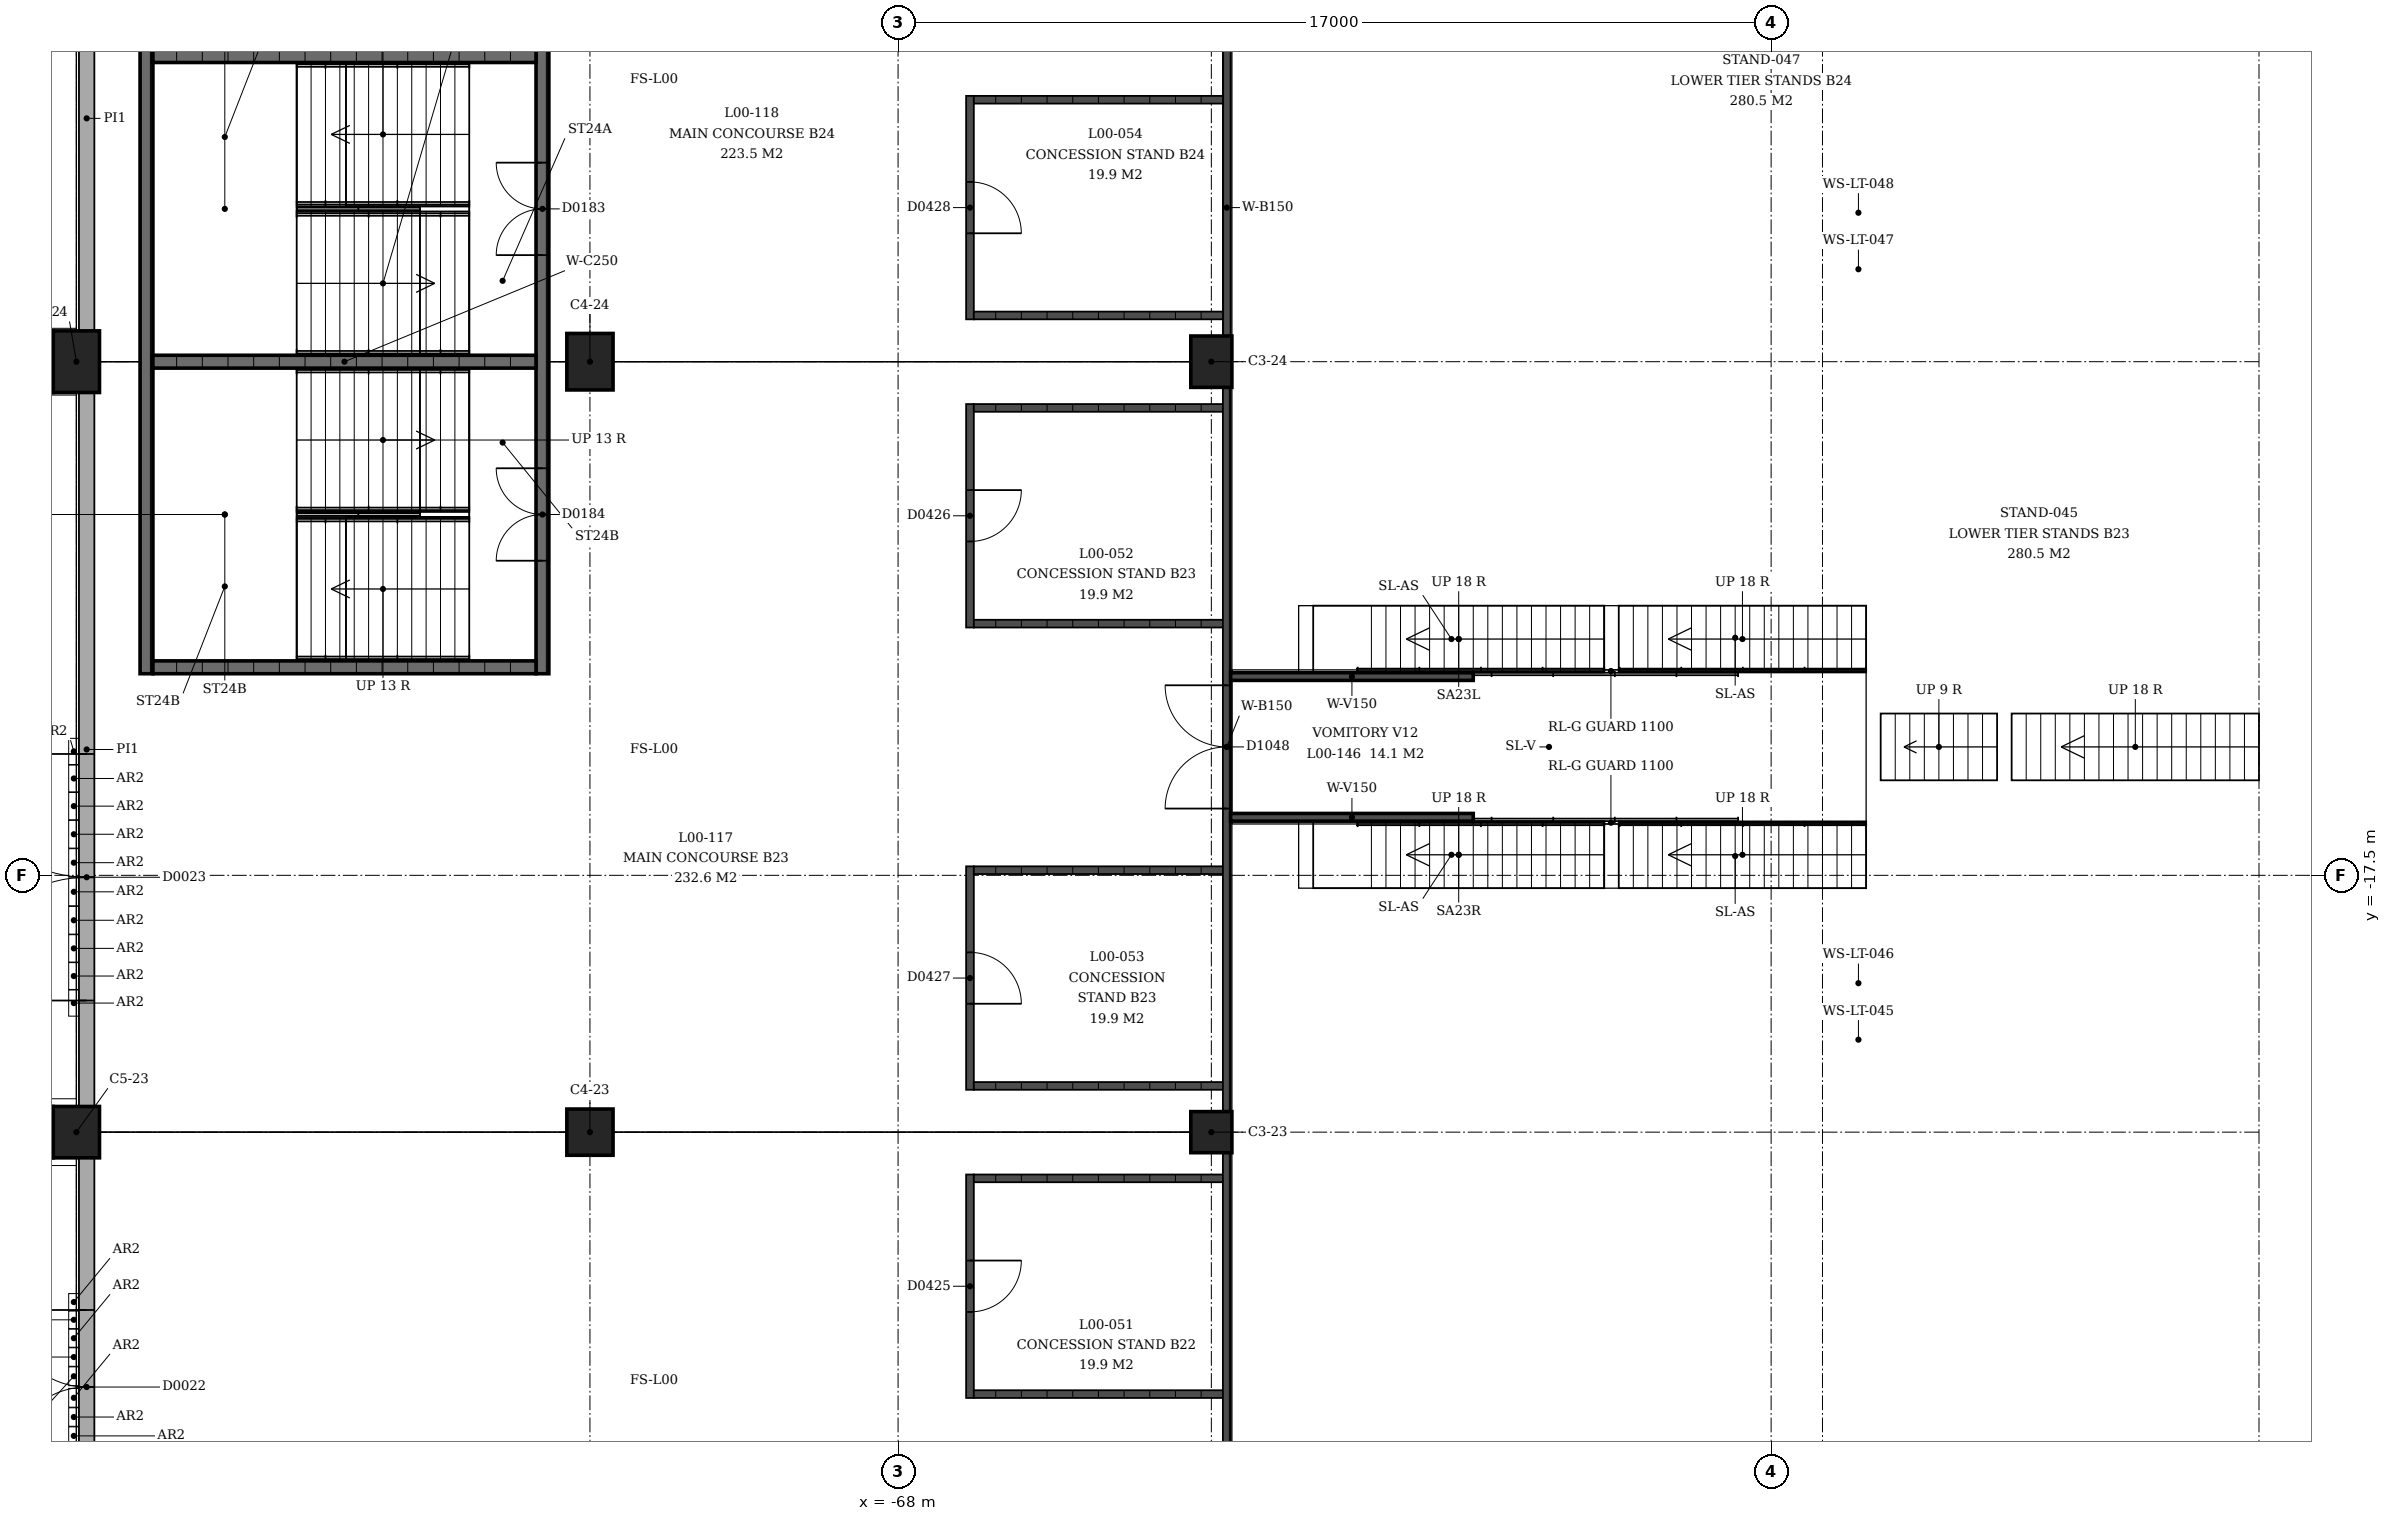
"""IFC4 building model, lengths in metres.
Left out: names, types, materials, properties, quantities, classifications, styles, units other than length and angle.
Written with IfcOpenShell. Run it as: python <this file> out.ifc"""

import sys

from ifc_helpers import new_model, si_unit, direction, frame, frame_2d, origin, origin_2d, place, context, subcontext, project, spatial, rectangle, extrude, element, fill, save


model = new_model("IFC4")
c1 = context("Model", 3, precision=1e-05, world=origin(), true_north=direction((0.0, 1.0)))
c2 = subcontext(c1, "Body", "Model", "MODEL_VIEW")
j1 = project(units=[si_unit("LENGTHUNIT", "METRE"), si_unit("PLANEANGLEUNIT", "RADIAN")], contexts=[c1])
p1 = place(None, origin())
s1 = spatial("IfcSite", under=j1, at=p1, CompositionType="ELEMENT")
p2 = place(p1, origin())
s2 = spatial("IfcBuilding", under=s1, at=p2, CompositionType="ELEMENT")
p3 = place(p2, origin())
s3 = spatial("IfcBuildingStorey", under=s2, at=p3, CompositionType="ELEMENT", Elevation=0.0)
p4 = place(p3, frame((-61.9, -22.5, 0.0), z_axis=(0.0, 0.0, 1.0), x_axis=(0.0, -1.0, 0.0)))
e1 = element("IfcColumn", 1, at=p4, inside=s3, PredefinedType="COLUMN", context=c2, shape_type="SweptSolid", body=[
    extrude(rectangle(XDim=0.8, YDim=0.8, at=origin_2d()), origin(), (0.0, 0.0, 1.0), 4.5),
])
p5 = place(p3, frame((-74.0, -22.5, 0.0), z_axis=(0.0, 0.0, 1.0), x_axis=(0.0, -1.0, 0.0)))
e2 = element("IfcColumn", 2, at=p5, inside=s3, PredefinedType="COLUMN", context=c2, shape_type="SweptSolid", body=[
    extrude(rectangle(XDim=0.9, YDim=0.9, at=origin_2d()), origin(), (0.0, 0.0, 1.0), 4.5),
])
p6 = place(p3, frame((-84.0, -22.5, 0.0), z_axis=(0.0, 0.0, 1.0), x_axis=(0.0, -1.0, 0.0)))
e3 = element("IfcColumn", 3, at=p6, inside=s3, PredefinedType="COLUMN", context=c2, shape_type="SweptSolid", body=[
    extrude(rectangle(XDim=1.0, YDim=0.9, at=origin_2d()), origin(), (0.0, 0.0, 1.0), 4.5),
])
p7 = place(p3, frame((-61.9, -7.5, 0.0), z_axis=(0.0, 0.0, 1.0), x_axis=(0.0, -1.0, 0.0)))
e4 = element("IfcColumn", 4, at=p7, inside=s3, PredefinedType="COLUMN", context=c2, shape_type="SweptSolid", body=[
    extrude(rectangle(XDim=1.0, YDim=0.8, at=origin_2d()), origin(), (0.0, 0.0, 1.0), 4.5),
])
p8 = place(p3, frame((-74.0, -7.5, 0.0), z_axis=(0.0, 0.0, 1.0), x_axis=(0.0, -1.0, 0.0)))
e5 = element("IfcColumn", 5, at=p8, inside=s3, PredefinedType="COLUMN", context=c2, shape_type="SweptSolid", body=[
    extrude(rectangle(XDim=1.1, YDim=0.9, at=origin_2d()), origin(), (0.0, 0.0, 1.0), 4.5),
])
p9 = place(p3, frame((-84.0, -7.5, 0.0), z_axis=(0.0, 0.0, 1.0), x_axis=(0.0, -1.0, 0.0)))
e6 = element("IfcColumn", 6, at=p9, inside=s3, PredefinedType="COLUMN", context=c2, shape_type="SweptSolid", body=[
    extrude(rectangle(XDim=1.2, YDim=0.9, at=origin_2d()), origin(), (0.0, 0.0, 1.0), 4.5),
])
p10 = place(p3, frame((-83.8, -36.9, 0.0), z_axis=(0.0, 0.0, 1.0), x_axis=(0.0, 1.0, 0.0)))
e7 = element("IfcWall", 7, at=p10, inside=s3, PredefinedType="SOLIDWALL", context=c2, shape_type="SweptSolid", body=[
    extrude(rectangle(XDim=13.9, YDim=0.3, at=frame_2d((6.95, 0.0))), origin(), (0.0, 0.0, 1.0), 3.09),
])
p11 = place(p10, frame((7.938, 0.0, 0.0)))
e8 = element("IfcOpeningElement", 8, at=p11, cuts=e7, PredefinedType="OPENING", context=c2, shape_type="SweptSolid", body=[
    extrude(rectangle(XDim=3.0, YDim=2.4, at=frame_2d((1.5, 1.2))), frame((0.0, 0.16, 0.0), z_axis=(0.0, -1.0, 0.0), x_axis=(1.0, 0.0, 0.0)), (0.0, 0.0, 1.0), 0.32),
])
p12 = place(p3, frame((-83.8, -22.0, 0.0), z_axis=(0.0, 0.0, 1.0), x_axis=(0.0, 1.0, 0.0)))
e9 = element("IfcWall", 9, at=p12, inside=s3, PredefinedType="SOLIDWALL", context=c2, shape_type="SweptSolid", body=[
    extrude(rectangle(XDim=13.9, YDim=0.3, at=frame_2d((6.95, 0.0))), origin(), (0.0, 0.0, 1.0), 3.09),
])
p13 = place(p12, frame((2.062, 0.0, 0.0)))
e10 = element("IfcOpeningElement", 10, at=p13, cuts=e9, PredefinedType="OPENING", context=c2, shape_type="SweptSolid", body=[
    extrude(rectangle(XDim=4.8, YDim=2.4, at=frame_2d((2.4, 1.2))), frame((0.0, 0.16, 0.0), z_axis=(0.0, -1.0, 0.0), x_axis=(1.0, 0.0, 0.0)), (0.0, 0.0, 1.0), 0.32),
])
p14 = place(p3, frame((-83.8, -6.9, 0.0), z_axis=(0.0, 0.0, 1.0), x_axis=(0.0, 1.0, 0.0)))
e11 = element("IfcWall", 11, at=p14, inside=s3, PredefinedType="SOLIDWALL", context=c2, shape_type="SweptSolid", body=[
    extrude(rectangle(XDim=13.9, YDim=0.3, at=frame_2d((6.95, 0.0))), origin(), (0.0, 0.0, 1.0), 3.09),
])
p15 = place(p14, frame((7.938, 0.0, 0.0)))
e12 = element("IfcOpeningElement", 12, at=p15, cuts=e11, PredefinedType="OPENING", context=c2, shape_type="SweptSolid", body=[
    extrude(rectangle(XDim=3.0, YDim=2.4, at=frame_2d((1.5, 1.2))), frame((0.0, 0.16, 0.0), z_axis=(0.0, -1.0, 0.0), x_axis=(1.0, 0.0, 0.0)), (0.0, 0.0, 1.0), 0.32),
])
p16 = place(p3, frame((-74.925, -1.425, 0.0), z_axis=(0.0, 0.0, 1.0), x_axis=(0.0, -1.0, 0.0)))
e13 = element("IfcWall", 13, at=p16, inside=s3, PredefinedType="SHEAR", context=c2, shape_type="SweptSolid", body=[
    extrude(rectangle(XDim=12.15, YDim=0.25, at=frame_2d((6.075, 0.0))), origin(), (0.0, 0.0, 1.0), 4.09),
])
p17 = place(p16, frame((2.2, 0.0, 0.0)))
e14 = element("IfcOpeningElement", 14, at=p17, cuts=e13, PredefinedType="OPENING", context=c2, shape_type="SweptSolid", body=[
    extrude(rectangle(XDim=1.8, YDim=2.1, at=frame_2d((0.9, 1.05))), frame((0.0, 0.125, 0.0), z_axis=(0.0, -1.0, 0.0), x_axis=(1.0, 0.0, 0.0)), (0.0, 0.0, 1.0), 0.25),
])
p18 = place(p16, frame((8.15, 0.0, 0.0)))
e15 = element("IfcOpeningElement", 15, at=p18, cuts=e13, PredefinedType="OPENING", context=c2, shape_type="SweptSolid", body=[
    extrude(rectangle(XDim=1.8, YDim=2.1, at=frame_2d((0.9, 1.05))), frame((0.0, 0.125, 0.0), z_axis=(0.0, -1.0, 0.0), x_axis=(1.0, 0.0, 0.0)), (0.0, 0.0, 1.0), 0.25),
])
p19 = place(p3, frame((-82.635, -1.425, 0.0), z_axis=(0.0, 0.0, 1.0), x_axis=(0.0, -1.0, 0.0)))
e16 = element("IfcWall", 16, at=p19, inside=s3, PredefinedType="SHEAR", context=c2, shape_type="SweptSolid", body=[
    extrude(rectangle(XDim=12.15, YDim=0.25, at=frame_2d((6.075, 0.0))), origin(), (0.0, 0.0, 1.0), 4.09),
])
for number, where, z_axis, x_axis in (
    (17, (-75.05, -1.55, 0.0), (0.0, 0.0, 1.0), (-1.0, 0.0, 0.0)),
    (18, (-75.05, -13.45, 0.0), (0.0, 0.0, 1.0), (-1.0, 0.0, 0.0)),
    (19, (-75.05, -7.5, 0.0), (0.0, 0.0, 1.0), (-1.0, 0.0, 0.0)),
):
    element("IfcWall", number, at=place(p3, frame(where, z_axis=z_axis, x_axis=x_axis)), inside=s3, PredefinedType="SHEAR", context=c2, shape_type="SweptSolid", body=[
        extrude(rectangle(XDim=7.46, YDim=0.25, at=frame_2d((3.73, 0.0))), origin(), (0.0, 0.0, 1.0), 4.09),
    ])
p20 = place(p3, frame((-66.6, -27.675, 0.0), z_axis=(0.0, 0.0, 1.0), x_axis=(0.0, 1.0, 0.0)))
e20 = element("IfcWall", 20, at=p20, inside=s3, PredefinedType="SOLIDWALL", context=c2, shape_type="SweptSolid", body=[
    extrude(rectangle(XDim=4.35, YDim=0.15, at=frame_2d((2.175, 0.0))), origin(), (0.0, 0.0, 1.0), 3.0),
])
p21 = place(p20, frame((1.675, 0.0, 0.0)))
e21 = element("IfcOpeningElement", 21, at=p21, cuts=e20, PredefinedType="OPENING", context=c2, shape_type="SweptSolid", body=[
    extrude(rectangle(XDim=1.0, YDim=2.1, at=frame_2d((0.5, 1.05))), frame((0.0, 0.075, 0.0), z_axis=(0.0, -1.0, 0.0), x_axis=(1.0, 0.0, 0.0)), (0.0, 0.0, 1.0), 0.15),
])
for number, where, z_axis, x_axis in (
    (22, (-61.6, -27.6, 0.0), (0.0, 0.0, 1.0), (-1.0, 0.0, 0.0)),
    (23, (-61.6, -23.4, 0.0), (0.0, 0.0, 1.0), (-1.0, 0.0, 0.0)),
):
    element("IfcWall", number, at=place(p3, frame(where, z_axis=z_axis, x_axis=x_axis)), inside=s3, PredefinedType="SOLIDWALL", context=c2, shape_type="SweptSolid", body=[
        extrude(rectangle(XDim=4.925, YDim=0.15, at=frame_2d((2.462, 0.0))), origin(), (0.0, 0.0, 1.0), 3.0),
    ])
p22 = place(p3, frame((-66.6, -8.325, 0.0), z_axis=(0.0, 0.0, 1.0), x_axis=(0.0, -1.0, 0.0)))
e24 = element("IfcWall", 24, at=p22, inside=s3, PredefinedType="SOLIDWALL", context=c2, shape_type="SweptSolid", body=[
    extrude(rectangle(XDim=4.35, YDim=0.15, at=frame_2d((2.175, 0.0))), origin(), (0.0, 0.0, 1.0), 3.0),
])
p23 = place(p22, frame((1.675, 0.0, 0.0)))
e25 = element("IfcOpeningElement", 25, at=p23, cuts=e24, PredefinedType="OPENING", context=c2, shape_type="SweptSolid", body=[
    extrude(rectangle(XDim=1.0, YDim=2.1, at=frame_2d((0.5, 1.05))), frame((0.0, 0.075, 0.0), z_axis=(0.0, -1.0, 0.0), x_axis=(1.0, 0.0, 0.0)), (0.0, 0.0, 1.0), 0.15),
])
for number, where, z_axis, x_axis in (
    (26, (-61.6, -8.4, 0.0), (0.0, 0.0, 1.0), (-1.0, 0.0, 0.0)),
    (27, (-61.6, -12.6, 0.0), (0.0, 0.0, 1.0), (-1.0, 0.0, 0.0)),
):
    element("IfcWall", number, at=place(p3, frame(where, z_axis=z_axis, x_axis=x_axis)), inside=s3, PredefinedType="SOLIDWALL", context=c2, shape_type="SweptSolid", body=[
        extrude(rectangle(XDim=4.925, YDim=0.15, at=frame_2d((2.462, 0.0))), origin(), (0.0, 0.0, 1.0), 3.0),
    ])
p24 = place(p3, frame((-66.6, -17.325, 0.0), z_axis=(0.0, 0.0, 1.0), x_axis=(0.0, -1.0, 0.0)))
e28 = element("IfcWall", 28, at=p24, inside=s3, PredefinedType="SOLIDWALL", context=c2, shape_type="SweptSolid", body=[
    extrude(rectangle(XDim=4.35, YDim=0.15, at=frame_2d((2.175, 0.0))), origin(), (0.0, 0.0, 1.0), 3.0),
])
p25 = place(p24, frame((1.675, 0.0, 0.0)))
e29 = element("IfcOpeningElement", 29, at=p25, cuts=e28, PredefinedType="OPENING", context=c2, shape_type="SweptSolid", body=[
    extrude(rectangle(XDim=1.0, YDim=2.1, at=frame_2d((0.5, 1.05))), frame((0.0, 0.075, 0.0), z_axis=(0.0, -1.0, 0.0), x_axis=(1.0, 0.0, 0.0)), (0.0, 0.0, 1.0), 0.15),
])
for number, where, z_axis, x_axis in (
    (30, (-61.6, -17.4, 0.0), (0.0, 0.0, 1.0), (-1.0, 0.0, 0.0)),
    (31, (-61.6, -21.6, 0.0), (0.0, 0.0, 1.0), (-1.0, 0.0, 0.0)),
):
    element("IfcWall", number, at=place(p3, frame(where, z_axis=z_axis, x_axis=x_axis)), inside=s3, PredefinedType="SOLIDWALL", context=c2, shape_type="SweptSolid", body=[
        extrude(rectangle(XDim=4.925, YDim=0.15, at=frame_2d((2.462, 0.0))), origin(), (0.0, 0.0, 1.0), 3.0),
    ])
p26 = place(p3, frame((-66.6, -6.675, 0.0), z_axis=(0.0, 0.0, 1.0), x_axis=(0.0, 1.0, 0.0)))
e32 = element("IfcWall", 32, at=p26, inside=s3, PredefinedType="SOLIDWALL", context=c2, shape_type="SweptSolid", body=[
    extrude(rectangle(XDim=4.35, YDim=0.15, at=frame_2d((2.175, 0.0))), origin(), (0.0, 0.0, 1.0), 3.0),
])
p27 = place(p26, frame((1.675, 0.0, 0.0)))
e33 = element("IfcOpeningElement", 33, at=p27, cuts=e32, PredefinedType="OPENING", context=c2, shape_type="SweptSolid", body=[
    extrude(rectangle(XDim=1.0, YDim=2.1, at=frame_2d((0.5, 1.05))), frame((0.0, 0.075, 0.0), z_axis=(0.0, -1.0, 0.0), x_axis=(1.0, 0.0, 0.0)), (0.0, 0.0, 1.0), 0.15),
])
for number, where, z_axis, x_axis in (
    (34, (-61.6, -6.6, 0.0), (0.0, 0.0, 1.0), (-1.0, 0.0, 0.0)),
    (35, (-61.6, -2.4, 0.0), (0.0, 0.0, 1.0), (-1.0, 0.0, 0.0)),
):
    element("IfcWall", number, at=place(p3, frame(where, z_axis=z_axis, x_axis=x_axis)), inside=s3, PredefinedType="SOLIDWALL", context=c2, shape_type="SweptSolid", body=[
        extrude(rectangle(XDim=4.925, YDim=0.15, at=frame_2d((2.462, 0.0))), origin(), (0.0, 0.0, 1.0), 3.0),
    ])
p28 = place(p3, frame((-61.6, -37.0, 0.0), z_axis=(0.0, 0.0, 1.0), x_axis=(0.0, 1.0, 0.0)))
e36 = element("IfcWall", 36, at=p28, inside=s3, PredefinedType="SOLIDWALL", context=c2, shape_type="SweptSolid", body=[
    extrude(rectangle(XDim=14.1, YDim=0.15, at=frame_2d((7.05, 0.0))), origin(), (0.0, 0.0, 1.0), 3.0),
])
p29 = place(p3, frame((-61.6, -22.1, 0.0), z_axis=(0.0, 0.0, 1.0), x_axis=(0.0, 1.0, 0.0)))
e37 = element("IfcWall", 37, at=p29, inside=s3, PredefinedType="SOLIDWALL", context=c2, shape_type="SweptSolid", body=[
    extrude(rectangle(XDim=14.1, YDim=0.15, at=frame_2d((7.05, 0.0))), origin(), (0.0, 0.0, 1.0), 3.0),
])
p30 = place(p29, frame((5.9, 0.0, 0.0)))
e38 = element("IfcOpeningElement", 38, at=p30, cuts=e37, PredefinedType="OPENING", context=c2, shape_type="SweptSolid", body=[
    extrude(rectangle(XDim=2.4, YDim=2.4, at=frame_2d((1.2, 1.2))), frame((0.0, 0.075, 0.0), z_axis=(0.0, -1.0, 0.0), x_axis=(1.0, 0.0, 0.0)), (0.0, 0.0, 1.0), 0.15),
])
p31 = place(p3, frame((-61.6, -7.0, 0.0), z_axis=(0.0, 0.0, 1.0), x_axis=(0.0, 1.0, 0.0)))
e39 = element("IfcWall", 39, at=p31, inside=s3, PredefinedType="SOLIDWALL", context=c2, shape_type="SweptSolid", body=[
    extrude(rectangle(XDim=14.1, YDim=0.15, at=frame_2d((7.05, 0.0))), origin(), (0.0, 0.0, 1.0), 3.0),
])
for number, where, z_axis, x_axis in (
    (40, (-56.8, -13.63, 0.0), (0.0, 0.0, 1.0), (-1.0, 0.0, 0.0)),
    (41, (-56.8, -16.37, 0.0), (0.0, 0.0, 1.0), (-1.0, 0.0, 0.0)),
):
    element("IfcWall", number, at=place(p3, frame(where, z_axis=z_axis, x_axis=x_axis)), inside=s3, PredefinedType="SOLIDWALL", context=c2, shape_type="SweptSolid", body=[
        extrude(rectangle(XDim=4.725, YDim=0.15, at=frame_2d((2.362, 0.0))), origin(), (0.0, 0.0, 1.0), 2.75),
    ])
p32 = place(p11, origin())
e42 = element("IfcDoor", 42, at=p32, inside=s3, OperationType="DOUBLE_DOOR_SINGLE_SWING", PredefinedType="DOOR", context=c2, shape_type="SweptSolid", body=[
    extrude(rectangle(XDim=3.0, YDim=2.4, at=frame_2d((1.5, 1.2))), frame((0.0, 0.025, 0.0), z_axis=(0.0, -1.0, 0.0), x_axis=(1.0, 0.0, 0.0)), (0.0, 0.0, 1.0), 0.05),
])
fill(e8, e42)
p33 = place(p13, origin())
e43 = element("IfcDoor", 43, at=p33, inside=s3, OperationType="DOUBLE_DOOR_SINGLE_SWING", PredefinedType="DOOR", context=c2, shape_type="SweptSolid", body=[
    extrude(rectangle(XDim=4.8, YDim=2.4, at=frame_2d((2.4, 1.2))), frame((0.0, 0.025, 0.0), z_axis=(0.0, -1.0, 0.0), x_axis=(1.0, 0.0, 0.0)), (0.0, 0.0, 1.0), 0.05),
])
fill(e10, e43)
p34 = place(p17, origin())
e44 = element("IfcDoor", 44, at=p34, inside=s3, OperationType="DOUBLE_DOOR_SINGLE_SWING", PredefinedType="DOOR", context=c2, shape_type="SweptSolid", body=[
    extrude(rectangle(XDim=1.8, YDim=2.1, at=frame_2d((0.9, 1.05))), frame((0.0, 0.025, 0.0), z_axis=(0.0, -1.0, 0.0), x_axis=(1.0, 0.0, 0.0)), (0.0, 0.0, 1.0), 0.05),
])
fill(e14, e44)
p35 = place(p18, origin())
e45 = element("IfcDoor", 45, at=p35, inside=s3, OperationType="DOUBLE_DOOR_SINGLE_SWING", PredefinedType="DOOR", context=c2, shape_type="SweptSolid", body=[
    extrude(rectangle(XDim=1.8, YDim=2.1, at=frame_2d((0.9, 1.05))), frame((0.0, 0.025, 0.0), z_axis=(0.0, -1.0, 0.0), x_axis=(1.0, 0.0, 0.0)), (0.0, 0.0, 1.0), 0.05),
])
fill(e15, e45)
p36 = place(p21, origin())
e46 = element("IfcDoor", 46, at=p36, inside=s3, OperationType="SINGLE_SWING_RIGHT", PredefinedType="DOOR", context=c2, shape_type="SweptSolid", body=[
    extrude(rectangle(XDim=1.0, YDim=2.1, at=frame_2d((0.5, 1.05))), frame((0.0, 0.025, 0.0), z_axis=(0.0, -1.0, 0.0), x_axis=(1.0, 0.0, 0.0)), (0.0, 0.0, 1.0), 0.05),
])
fill(e21, e46)
p37 = place(p23, origin())
e47 = element("IfcDoor", 47, at=p37, inside=s3, OperationType="SINGLE_SWING_RIGHT", PredefinedType="DOOR", context=c2, shape_type="SweptSolid", body=[
    extrude(rectangle(XDim=1.0, YDim=2.1, at=frame_2d((0.5, 1.05))), frame((0.0, 0.025, 0.0), z_axis=(0.0, -1.0, 0.0), x_axis=(1.0, 0.0, 0.0)), (0.0, 0.0, 1.0), 0.05),
])
fill(e25, e47)
p38 = place(p25, origin())
e48 = element("IfcDoor", 48, at=p38, inside=s3, OperationType="SINGLE_SWING_LEFT", PredefinedType="DOOR", context=c2, shape_type="SweptSolid", body=[
    extrude(rectangle(XDim=1.0, YDim=2.1, at=frame_2d((0.5, 1.05))), frame((0.0, 0.025, 0.0), z_axis=(0.0, -1.0, 0.0), x_axis=(1.0, 0.0, 0.0)), (0.0, 0.0, 1.0), 0.05),
])
fill(e29, e48)
p39 = place(p27, origin())
e49 = element("IfcDoor", 49, at=p39, inside=s3, OperationType="SINGLE_SWING_LEFT", PredefinedType="DOOR", context=c2, shape_type="SweptSolid", body=[
    extrude(rectangle(XDim=1.0, YDim=2.1, at=frame_2d((0.5, 1.05))), frame((0.0, 0.025, 0.0), z_axis=(0.0, -1.0, 0.0), x_axis=(1.0, 0.0, 0.0)), (0.0, 0.0, 1.0), 0.05),
])
fill(e33, e49)
p40 = place(p30, origin())
e50 = element("IfcDoor", 50, at=p40, inside=s3, OperationType="DOUBLE_DOOR_SINGLE_SWING", PredefinedType="DOOR", context=c2, shape_type="SweptSolid", body=[
    extrude(rectangle(XDim=2.4, YDim=2.4, at=frame_2d((1.2, 1.2))), frame((0.0, 0.025, 0.0), z_axis=(0.0, -1.0, 0.0), x_axis=(1.0, 0.0, 0.0)), (0.0, 0.0, 1.0), 0.05),
])
fill(e38, e50)
save(model, sys.argv[1])
